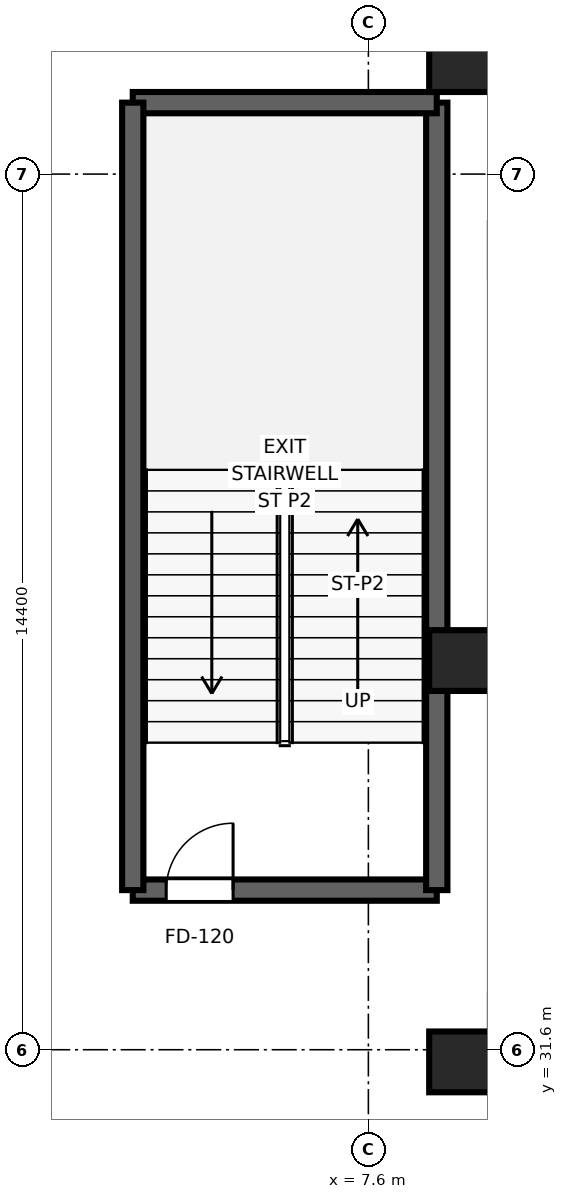
"""IFC4 building model, lengths in metres.
Left out: names, types, materials, properties, quantities, classifications, styles, units other than length and angle.
Written with IfcOpenShell. Run it as: python <this file> out.ifc"""

import sys

from ifc_helpers import new_model, si_unit, direction, frame, frame_2d, origin, origin_2d, place, context, subcontext, project, spatial, rectangle, extrude, source, transform, mapped, element, fill, save


model = new_model("IFC4")
c1 = context("Model", 3, precision=1e-05, world=origin(), true_north=direction((0.0, 1.0)))
c2 = subcontext(c1, "Body", "Model", "MODEL_VIEW")
j1 = project(units=[si_unit("LENGTHUNIT", "METRE"), si_unit("PLANEANGLEUNIT", "RADIAN")], contexts=[c1])
p1 = place(None, origin())
s1 = spatial("IfcSite", under=j1, at=p1, CompositionType="ELEMENT")
p2 = place(p1, origin())
s2 = spatial("IfcBuilding", under=s1, at=p2, CompositionType="ELEMENT")
p3 = place(p2, frame((0.0, 0.0, 6.0)))
s3 = spatial("IfcBuildingStorey", under=s2, at=p3, CompositionType="ELEMENT", Elevation=6.0)
p4 = place(p3, frame((3.725, 34.225, 0.0), z_axis=(0.0, 0.0, 1.0), x_axis=(1.0, 0.0, 0.0)))
e1 = element("IfcWall", 1, at=p4, inside=s3, PredefinedType="SHEAR", context=c2, shape_type="SweptSolid", body=[
    extrude(rectangle(XDim=5.0, YDim=0.35, at=frame_2d((2.5, 0.0))), origin(), (0.0, 0.0, 1.0), 5.0),
])
p5 = place(p4, frame((0.55, 0.0, 0.0)))
e2 = element("IfcOpeningElement", 2, at=p5, cuts=e1, PredefinedType="OPENING", context=c2, shape_type="SweptSolid", body=[
    extrude(rectangle(XDim=1.1, YDim=2.12, at=frame_2d((0.55, 1.06))), frame((0.0, 0.185, 0.0), z_axis=(0.0, -1.0, 0.0), x_axis=(1.0, 0.0, 0.0)), (0.0, 0.0, 1.0), 0.37),
])
p6 = place(p3, frame((8.725, 34.225, 0.0), z_axis=(0.0, 0.0, 1.0), x_axis=(0.0, 1.0, 0.0)))
e3 = element("IfcWall", 3, at=p6, inside=s3, PredefinedType="SHEAR", context=c2, shape_type="SweptSolid", body=[
    extrude(rectangle(XDim=12.95, YDim=0.35, at=frame_2d((6.475, 0.0))), origin(), (0.0, 0.0, 1.0), 5.0),
])
p7 = place(p3, frame((8.725, 47.175, 0.0), z_axis=(0.0, 0.0, 1.0), x_axis=(-1.0, 0.0, 0.0)))
e4 = element("IfcWall", 4, at=p7, inside=s3, PredefinedType="SHEAR", context=c2, shape_type="SweptSolid", body=[
    extrude(rectangle(XDim=5.0, YDim=0.35, at=frame_2d((2.5, 0.0))), origin(), (0.0, 0.0, 1.0), 5.0),
])
p8 = place(p3, frame((3.725, 47.175, 0.0), z_axis=(0.0, 0.0, 1.0), x_axis=(0.0, -1.0, 0.0)))
e5 = element("IfcWall", 5, at=p8, inside=s3, PredefinedType="SHEAR", context=c2, shape_type="SweptSolid", body=[
    extrude(rectangle(XDim=12.95, YDim=0.35, at=frame_2d((6.475, 0.0))), origin(), (0.0, 0.0, 1.0), 5.0),
])
m1 = source(origin(), c2, "Body", "SweptSolid", [
    extrude(rectangle(XDim=1.0, YDim=1.0, at=origin_2d()), origin(), (0.0, 0.0, 1.0), 5.0),
])
for number, where, z_axis, x_axis in (
    (6, (9.1, 47.85, 0.0), (0.0, 0.0, 1.0), (1.0, 0.0, 0.0)),
    (7, (9.1, 38.0, 0.0), (0.0, 0.0, 1.0), (1.0, 0.0, 0.0)),
    (8, (9.1, 31.4, 0.0), (0.0, 0.0, 1.0), (1.0, 0.0, 0.0)),
):
    element("IfcColumn", number, at=place(p3, frame(where, z_axis=z_axis, x_axis=x_axis)), inside=s3, PredefinedType="COLUMN", context=c2, shape_type="MappedRepresentation", body=[
        mapped(m1, transform((0.0, 0.0, 0.0), x_axis=(1.0, 0.0, 0.0), y_axis=(0.0, 1.0, 0.0), z_axis=(0.0, 0.0, 1.0), scale=1.0)),
    ])
m2 = source(origin(), c2, "Body", "SweptSolid", [
    extrude(rectangle(XDim=1.1, YDim=2.12, at=frame_2d((0.55, 1.06))), frame((0.0, 0.025, 0.0), z_axis=(0.0, -1.0, 0.0), x_axis=(1.0, 0.0, 0.0)), (0.0, 0.0, 1.0), 0.05),
])
p9 = place(p5, origin())
e9 = element("IfcDoor", 9, at=p9, inside=s3, OperationType="SINGLE_SWING_RIGHT", PredefinedType="DOOR", context=c2, shape_type="MappedRepresentation", body=[
    mapped(m2, transform((0.0, 0.0, 0.0), x_axis=(1.0, 0.0, 0.0), y_axis=(0.0, 1.0, 0.0), z_axis=(0.0, 0.0, 1.0), scale=1.0)),
])
fill(e2, e9)
save(model, sys.argv[1])
